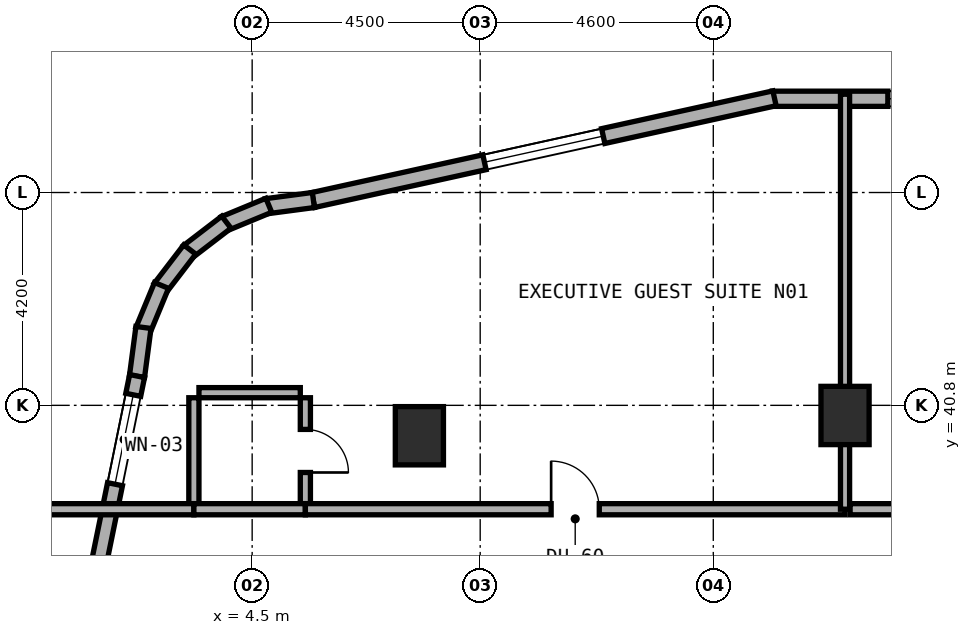
"""IFC4 building model, lengths in metres.
Left out: names, types, materials, properties, quantities, classifications, styles, units other than length and angle.
Written with IfcOpenShell. Run it as: python <this file> out.ifc"""

import sys

from ifc_helpers import new_model, si_unit, direction, frame, frame_2d, origin, origin_2d, place, context, subcontext, project, spatial, rectangle, extrude, element, fill, save


model = new_model("IFC4")
c1 = context("Model", 3, precision=1e-05, world=origin(), true_north=direction((0.0, 1.0)))
c2 = subcontext(c1, "Body", "Model", "MODEL_VIEW")
j1 = project(units=[si_unit("LENGTHUNIT", "METRE"), si_unit("PLANEANGLEUNIT", "RADIAN")], contexts=[c1])
p1 = place(None, origin())
s1 = spatial("IfcSite", under=j1, at=p1, CompositionType="ELEMENT")
p2 = place(p1, origin())
s2 = spatial("IfcBuilding", under=s1, at=p2, CompositionType="ELEMENT")
p3 = place(p2, frame((0.0, 0.0, 59.0)))
s3 = spatial("IfcBuildingStorey", under=s2, at=p3, CompositionType="ELEMENT", Elevation=59.0)
for number, where, z_axis, x_axis in (
    (1, (16.2, 40.6, 0.0), (0.0, 0.0, 1.0), (1.0, 0.0, 0.0)),
    (2, (7.8, 40.2, 0.0), (0.0, 0.0, 1.0), (1.0, 0.0, 0.0)),
):
    element("IfcColumn", number, at=place(p3, frame(where, z_axis=z_axis, x_axis=x_axis)), inside=s3, PredefinedType="COLUMN", context=c2, shape_type="SweptSolid", body=[
        extrude(rectangle(XDim=0.95, YDim=1.15, at=origin_2d()), origin(), (0.0, 0.0, 1.0), 3.5),
    ])
p4 = place(p3, frame((27.353, 46.85, 0.0), z_axis=(0.0, 0.0, 1.0), x_axis=(-1.0, 0.0, 0.0)))
e3 = element("IfcWall", 3, at=p4, inside=s3, PredefinedType="STANDARD", context=c2, shape_type="SweptSolid", body=[
    extrude(rectangle(XDim=12.591, YDim=0.3, at=frame_2d((6.295, 0.0))), origin(), (0.0, 0.0, 1.0), 3.22),
])
p5 = place(p4, frame((5.713, 0.0, 0.0)))
e4 = element("IfcOpeningElement", 4, at=p5, cuts=e3, PredefinedType="OPENING", context=c2, shape_type="SweptSolid", body=[
    extrude(rectangle(XDim=1.2, YDim=2.15, at=frame_2d((0.6, 1.075))), frame((0.0, 0.16, 0.0), z_axis=(0.0, -1.0, 0.0), x_axis=(1.0, 0.0, 0.0)), (0.0, 0.0, 1.0), 0.32),
])
p6 = place(p4, frame((1.552, 0.0, 0.8)))
e5 = element("IfcOpeningElement", 5, at=p6, cuts=e3, PredefinedType="OPENING", context=c2, shape_type="SweptSolid", body=[
    extrude(rectangle(XDim=2.4, YDim=1.6, at=frame_2d((1.2, 0.8))), frame((0.0, 0.16, 0.0), z_axis=(0.0, -1.0, 0.0), x_axis=(1.0, 0.0, 0.0)), (0.0, 0.0, 1.0), 0.32),
])
p7 = place(p4, frame((7.908, 0.0, 0.8)))
e6 = element("IfcOpeningElement", 6, at=p7, cuts=e3, PredefinedType="OPENING", context=c2, shape_type="SweptSolid", body=[
    extrude(rectangle(XDim=2.4, YDim=1.6, at=frame_2d((1.2, 0.8))), frame((0.0, 0.16, 0.0), z_axis=(0.0, -1.0, 0.0), x_axis=(1.0, 0.0, 0.0)), (0.0, 0.0, 1.0), 0.32),
])
p8 = place(p3, frame((14.808, 46.859, 0.0), z_axis=(0.0, 0.0, 1.0), x_axis=(-0.976555357219, -0.21526642629, 0.0)))
e7 = element("IfcWall", 7, at=p8, inside=s3, PredefinedType="STANDARD", context=c2, shape_type="SweptSolid", body=[
    extrude(rectangle(XDim=9.323, YDim=0.3, at=frame_2d((4.661, 0.0))), origin(), (0.0, 0.0, 1.0), 3.22),
])
p9 = place(p8, frame((3.461, 0.0, 0.8)))
e8 = element("IfcOpeningElement", 8, at=p9, cuts=e7, PredefinedType="OPENING", context=c2, shape_type="SweptSolid", body=[
    extrude(rectangle(XDim=2.4, YDim=1.6, at=frame_2d((1.2, 0.8))), frame((0.0, 0.16, 0.0), z_axis=(0.0, -1.0, 0.0), x_axis=(1.0, 0.0, 0.0)), (0.0, 0.0, 1.0), 0.32),
])
p10 = place(p3, frame((5.708, 44.852, 0.0), z_axis=(0.0, 0.0, 1.0), x_axis=(-0.991359246108, -0.131174864804, 0.0)))
e9 = element("IfcWall", 9, at=p10, inside=s3, PredefinedType="STANDARD", context=c2, shape_type="SweptSolid", body=[
    extrude(rectangle(XDim=0.938, YDim=0.3, at=frame_2d((0.469, 0.0))), origin(), (0.0, 0.0, 1.0), 3.22),
])
p11 = place(p3, frame((4.828, 44.748, 0.0), z_axis=(0.0, 0.0, 1.0), x_axis=(-0.923982547689, -0.382434636986, 0.0)))
e10 = element("IfcWall", 10, at=p11, inside=s3, PredefinedType="STANDARD", context=c2, shape_type="SweptSolid", body=[
    extrude(rectangle(XDim=0.954, YDim=0.3, at=frame_2d((0.477, 0.0))), origin(), (0.0, 0.0, 1.0), 3.22),
])
for number, where, z_axis, x_axis in (
    (11, (3.991, 44.414, 0.0), (0.0, 0.0, 1.0), (-0.794, -0.608, 0.0)),
    (12, (3.268, 43.875, 0.0), (0.0, 0.0, 1.0), (-0.608, -0.794, 0.0)),
):
    element("IfcWall", number, at=place(p3, frame(where, z_axis=z_axis, x_axis=x_axis)), inside=s3, PredefinedType="STANDARD", context=c2, shape_type="SweptSolid", body=[
        extrude(rectangle(XDim=0.955, YDim=0.3, at=frame_2d((0.478, 0.0))), origin(), (0.0, 0.0, 1.0), 3.22),
    ])
p12 = place(p3, frame((2.711, 43.166, 0.0), z_axis=(0.0, 0.0, 1.0), x_axis=(-0.382344263057, -0.924019948111, 0.0)))
e13 = element("IfcWall", 13, at=p12, inside=s3, PredefinedType="STANDARD", context=c2, shape_type="SweptSolid", body=[
    extrude(rectangle(XDim=0.955, YDim=0.3, at=frame_2d((0.477, 0.0))), origin(), (0.0, 0.0, 1.0), 3.22),
])
p13 = place(p3, frame((2.355, 42.337, 0.0), z_axis=(0.0, 0.0, 1.0), x_axis=(-0.130454512571, -0.991454295543, 0.0)))
e14 = element("IfcWall", 14, at=p13, inside=s3, PredefinedType="STANDARD", context=c2, shape_type="SweptSolid", body=[
    extrude(rectangle(XDim=0.973, YDim=0.3, at=frame_2d((0.487, 0.0))), origin(), (0.0, 0.0, 1.0), 3.22),
])
p14 = place(p3, frame((2.229, 41.378, 0.0), z_axis=(0.0, 0.0, 1.0), x_axis=(-0.199990901713, -0.979797754249, 0.0)))
e15 = element("IfcWall", 15, at=p14, inside=s3, PredefinedType="STANDARD", context=c2, shape_type="SweptSolid", body=[
    extrude(rectangle(XDim=10.065, YDim=0.3, at=frame_2d((5.033, 0.0))), origin(), (0.0, 0.0, 1.0), 3.22),
])
p15 = place(p14, frame((0.378, 0.0, 0.85)))
e16 = element("IfcOpeningElement", 16, at=p15, cuts=e15, PredefinedType="OPENING", context=c2, shape_type="SweptSolid", body=[
    extrude(rectangle(XDim=1.8, YDim=1.5, at=frame_2d((0.9, 0.75))), frame((0.0, 0.16, 0.0), z_axis=(0.0, -1.0, 0.0), x_axis=(1.0, 0.0, 0.0)), (0.0, 0.0, 1.0), 0.32),
])
p16 = place(p14, frame((5.236, 0.0, 0.8)))
e17 = element("IfcOpeningElement", 17, at=p16, cuts=e15, PredefinedType="OPENING", context=c2, shape_type="SweptSolid", body=[
    extrude(rectangle(XDim=2.4, YDim=1.6, at=frame_2d((1.2, 0.8))), frame((0.0, 0.16, 0.0), z_axis=(0.0, -1.0, 0.0), x_axis=(1.0, 0.0, 0.0)), (0.0, 0.0, 1.0), 0.32),
])
p17 = place(p3, frame((5.55, 38.85, 0.0), z_axis=(0.0, 0.0, 1.0), x_axis=(0.0, 1.0, 0.0)))
e18 = element("IfcWall", 18, at=p17, inside=s3, PredefinedType="PLUMBINGWALL", context=c2, shape_type="SweptSolid", body=[
    extrude(rectangle(XDim=2.1, YDim=0.2, at=frame_2d((1.05, 0.0))), origin(), (0.0, 0.0, 1.0), 3.22),
])
p18 = place(p17, frame((0.625, 0.0, 0.0)))
e19 = element("IfcOpeningElement", 19, at=p18, cuts=e18, PredefinedType="OPENING", context=c2, shape_type="SweptSolid", body=[
    extrude(rectangle(XDim=0.85, YDim=2.1, at=frame_2d((0.425, 1.05))), frame((0.0, 0.11, 0.0), z_axis=(0.0, -1.0, 0.0), x_axis=(1.0, 0.0, 0.0)), (0.0, 0.0, 1.0), 0.22),
])
p19 = place(p3, frame((3.45, 41.05, 0.0), z_axis=(0.0, 0.0, 1.0), x_axis=(1.0, 0.0, 0.0)))
e20 = element("IfcWall", 20, at=p19, inside=s3, PredefinedType="PLUMBINGWALL", context=c2, shape_type="SweptSolid", body=[
    extrude(rectangle(XDim=2.0, YDim=0.2, at=frame_2d((1.0, 0.0))), origin(), (0.0, 0.0, 1.0), 3.22),
])
p20 = place(p3, frame((3.35, 38.85, 0.0), z_axis=(0.0, 0.0, 1.0), x_axis=(0.0, 1.0, 0.0)))
e21 = element("IfcWall", 21, at=p20, inside=s3, PredefinedType="PLUMBINGWALL", context=c2, shape_type="SweptSolid", body=[
    extrude(rectangle(XDim=2.1, YDim=0.2, at=frame_2d((1.05, 0.0))), origin(), (0.0, 0.0, 1.0), 3.22),
])
p21 = place(p3, frame((0.24, 38.75, 0.0), z_axis=(0.0, 0.0, 1.0), x_axis=(1.0, 0.0, 0.0)))
e22 = element("IfcWall", 22, at=p21, inside=s3, PredefinedType="SOLIDWALL", context=c2, shape_type="SweptSolid", body=[
    extrude(rectangle(XDim=3.11, YDim=0.22, at=frame_2d((1.555, 0.0))), origin(), (0.0, 0.0, 1.0), 3.22),
])
p22 = place(p3, frame((3.35, 38.75, 0.0), z_axis=(0.0, 0.0, 1.0), x_axis=(1.0, 0.0, 0.0)))
e23 = element("IfcWall", 23, at=p22, inside=s3, PredefinedType="SOLIDWALL", context=c2, shape_type="SweptSolid", body=[
    extrude(rectangle(XDim=2.2, YDim=0.22, at=frame_2d((1.1, 0.0))), origin(), (0.0, 0.0, 1.0), 3.22),
])
p23 = place(p3, frame((5.55, 38.75, 0.0), z_axis=(0.0, 0.0, 1.0), x_axis=(1.0, 0.0, 0.0)))
e24 = element("IfcWall", 24, at=p23, inside=s3, PredefinedType="SOLIDWALL", context=c2, shape_type="SweptSolid", body=[
    extrude(rectangle(XDim=10.65, YDim=0.22, at=frame_2d((5.325, 0.0))), origin(), (0.0, 0.0, 1.0), 2.495),
])
p24 = place(p23, frame((4.85, 0.0, 0.0)))
e25 = element("IfcOpeningElement", 25, at=p24, cuts=e24, PredefinedType="OPENING", context=c2, shape_type="SweptSolid", body=[
    extrude(rectangle(XDim=0.95, YDim=2.1, at=frame_2d((0.475, 1.05))), frame((0.0, 0.12, 0.0), z_axis=(0.0, -1.0, 0.0), x_axis=(1.0, 0.0, 0.0)), (0.0, 0.0, 1.0), 0.24),
])
p25 = place(p3, frame((16.2, 38.75, 0.0), z_axis=(0.0, 0.0, 1.0), x_axis=(0.0, 1.0, 0.0)))
e26 = element("IfcWall", 26, at=p25, inside=s3, PredefinedType="SOLIDWALL", context=c2, shape_type="SweptSolid", body=[
    extrude(rectangle(XDim=8.19, YDim=0.18, at=frame_2d((4.095, 0.0))), origin(), (0.0, 0.0, 1.0), 2.495),
])
p26 = place(p3, frame((16.3, 38.75, 0.0), z_axis=(0.0, 0.0, 1.0), x_axis=(1.0, 0.0, 0.0)))
e27 = element("IfcWall", 27, at=p26, inside=s3, PredefinedType="SOLIDWALL", context=c2, shape_type="SweptSolid", body=[
    extrude(rectangle(XDim=17.8, YDim=0.22, at=frame_2d((8.9, 0.0))), origin(), (0.0, 0.0, 1.0), 2.495),
])
p27 = place(p26, frame((7.573, 0.0, 0.0)))
e28 = element("IfcOpeningElement", 28, at=p27, cuts=e27, PredefinedType="OPENING", context=c2, shape_type="SweptSolid", body=[
    extrude(rectangle(XDim=0.95, YDim=2.1, at=frame_2d((0.475, 1.05))), frame((0.0, 0.12, 0.0), z_axis=(0.0, -1.0, 0.0), x_axis=(1.0, 0.0, 0.0)), (0.0, 0.0, 1.0), 0.24),
])
p28 = place(p7, origin())
e29 = element("IfcWindow", 29, at=p28, inside=s3, PartitioningType="SINGLE_PANEL", PredefinedType="WINDOW", context=c2, shape_type="SweptSolid", body=[
    extrude(rectangle(XDim=2.4, YDim=1.6, at=frame_2d((1.2, 0.8))), frame((0.0, 0.03, 0.0), z_axis=(0.0, -1.0, 0.0), x_axis=(1.0, 0.0, 0.0)), (0.0, 0.0, 1.0), 0.06),
])
fill(e6, e29)
p29 = place(p9, origin())
e30 = element("IfcWindow", 30, at=p29, inside=s3, PartitioningType="SINGLE_PANEL", PredefinedType="WINDOW", context=c2, shape_type="SweptSolid", body=[
    extrude(rectangle(XDim=2.4, YDim=1.6, at=frame_2d((1.2, 0.8))), frame((0.0, 0.03, 0.0), z_axis=(0.0, -1.0, 0.0), x_axis=(1.0, 0.0, 0.0)), (0.0, 0.0, 1.0), 0.06),
])
fill(e8, e30)
p30 = place(p15, origin())
e31 = element("IfcWindow", 31, at=p30, inside=s3, PartitioningType="SINGLE_PANEL", PredefinedType="WINDOW", context=c2, shape_type="SweptSolid", body=[
    extrude(rectangle(XDim=1.8, YDim=1.5, at=frame_2d((0.9, 0.75))), frame((0.0, 0.03, 0.0), z_axis=(0.0, -1.0, 0.0), x_axis=(1.0, 0.0, 0.0)), (0.0, 0.0, 1.0), 0.06),
])
fill(e16, e31)
p31 = place(p18, frame((0.85, 0.0, 0.0), z_axis=(0.0, 0.0, 1.0), x_axis=(-1.0, 0.0, 0.0)))
e32 = element("IfcDoor", 32, at=p31, inside=s3, OperationType="SINGLE_SWING_RIGHT", PredefinedType="DOOR", context=c2, shape_type="SweptSolid", body=[
    extrude(rectangle(XDim=0.85, YDim=2.1, at=frame_2d((0.425, 1.05))), frame((0.0, 0.025, 0.0), z_axis=(0.0, -1.0, 0.0), x_axis=(1.0, 0.0, 0.0)), (0.0, 0.0, 1.0), 0.05),
])
fill(e19, e32)
p32 = place(p24, origin())
e33 = element("IfcDoor", 33, at=p32, inside=s3, OperationType="SINGLE_SWING_LEFT", PredefinedType="DOOR", context=c2, shape_type="SweptSolid", body=[
    extrude(rectangle(XDim=0.95, YDim=2.1, at=frame_2d((0.475, 1.05))), frame((0.0, 0.025, 0.0), z_axis=(0.0, -1.0, 0.0), x_axis=(1.0, 0.0, 0.0)), (0.0, 0.0, 1.0), 0.05),
])
fill(e25, e33)
save(model, sys.argv[1])
